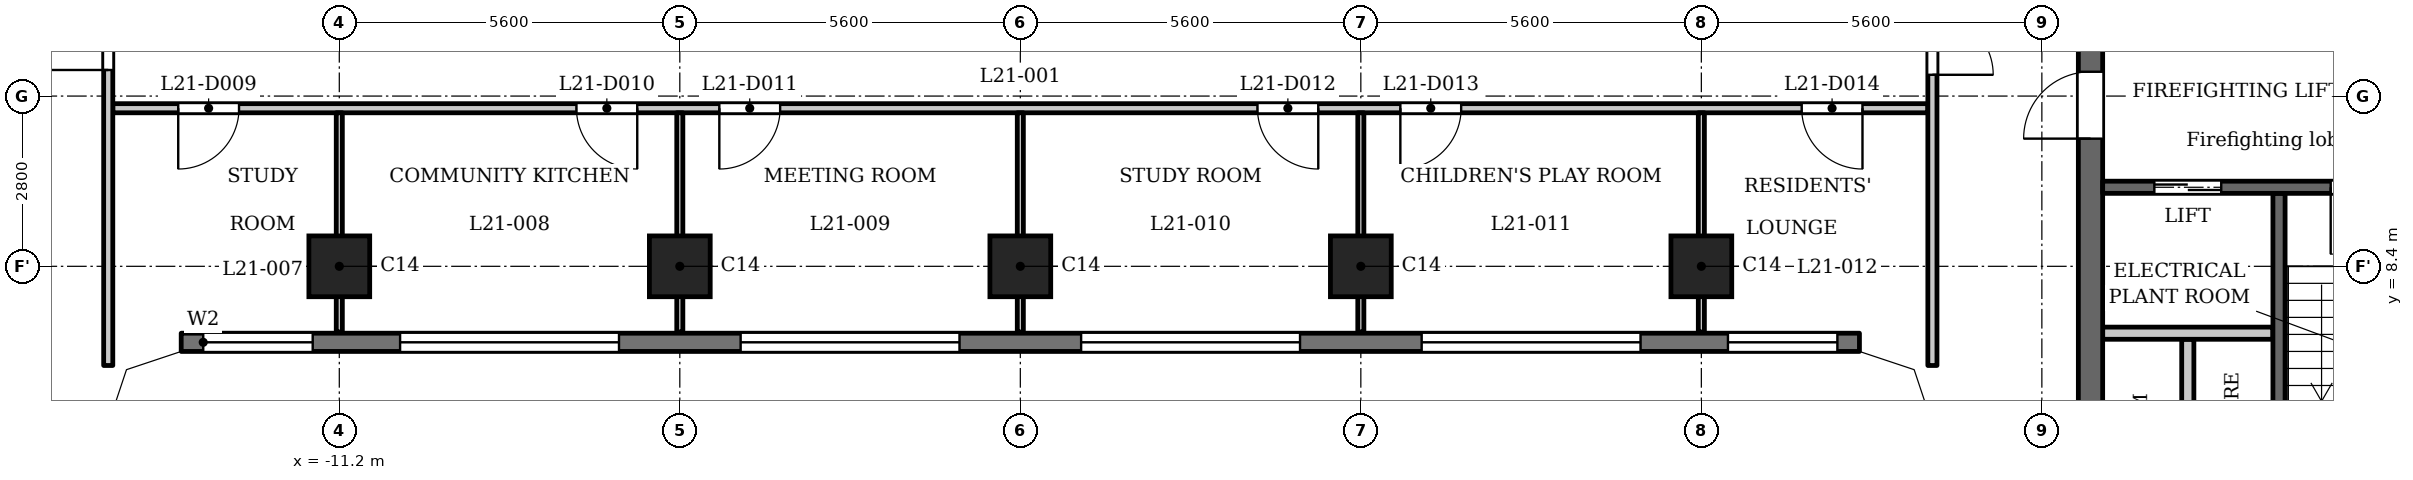
"""IFC4 building model, lengths in metres.
Left out: names, types, materials, properties, quantities, classifications, styles, units other than length and angle.
Written with IfcOpenShell. Run it as: python <this file> out.ifc"""

import sys

from ifc_helpers import new_model, si_unit, direction, frame, frame_2d, origin, origin_2d, place, context, subcontext, project, spatial, polyline, rectangle, outline, extrude, element, fill, save


model = new_model("IFC4")
c1 = context("Model", 3, precision=1e-05, world=origin(), true_north=direction((0.0, 1.0)))
c2 = subcontext(c1, "Body", "Model", "MODEL_VIEW")
j1 = project(units=[si_unit("LENGTHUNIT", "METRE"), si_unit("PLANEANGLEUNIT", "RADIAN")], contexts=[c1])
p1 = place(None, origin())
s1 = spatial("IfcSite", under=j1, at=p1, CompositionType="ELEMENT")
p2 = place(p1, origin())
s2 = spatial("IfcBuilding", under=s1, at=p2, CompositionType="ELEMENT")
p3 = place(p2, frame((0.0, 0.0, 86.8)))
s3 = spatial("IfcBuildingStorey", under=s2, at=p3, CompositionType="ELEMENT", Elevation=86.8)
for number, where, z_axis, x_axis in (
    (1, (-11.2, 8.4, 0.0), (0.0, 0.0, 1.0), (1.0, 0.0, 0.0)),
    (2, (-5.6, 8.4, 0.0), (0.0, 0.0, 1.0), (1.0, 0.0, 0.0)),
    (3, (0.0, 8.4, 0.0), (0.0, 0.0, 1.0), (1.0, 0.0, 0.0)),
    (4, (5.6, 8.4, 0.0), (0.0, 0.0, 1.0), (1.0, 0.0, 0.0)),
    (5, (11.2, 8.4, 0.0), (0.0, 0.0, 1.0), (1.0, 0.0, 0.0)),
):
    element("IfcColumn", number, at=place(p3, frame(where, z_axis=z_axis, x_axis=x_axis)), inside=s3, PredefinedType="COLUMN", context=c2, shape_type="SweptSolid", body=[
        extrude(rectangle(XDim=1.0, YDim=1.0, at=origin_2d()), origin(), (0.0, 0.0, 1.0), 3.5),
    ])
p4 = place(p3, frame((-13.8, 7.15, 0.0), z_axis=(0.0, 0.0, 1.0), x_axis=(1.0, 0.0, 0.0)))
e6 = element("IfcWall", 6, at=p4, inside=s3, PredefinedType="SOLIDWALL", context=c2, shape_type="SweptSolid", body=[
    extrude(rectangle(XDim=27.6, YDim=0.3, at=frame_2d((13.8, 0.0))), origin(), (0.0, 0.0, 1.0), 3.2),
])
p5 = place(p4, frame((0.363, 0.0, 0.9)))
e7 = element("IfcOpeningElement", 7, at=p5, cuts=e6, PredefinedType="OPENING", context=c2, shape_type="SweptSolid", body=[
    extrude(rectangle(XDim=1.8, YDim=1.25, at=frame_2d((0.9, 0.625))), frame((0.0, 0.16, 0.0), z_axis=(0.0, -1.0, 0.0), x_axis=(1.0, 0.0, 0.0)), (0.0, 0.0, 1.0), 0.32),
])
p6 = place(p4, frame((3.6, 0.0, 1.2)))
e8 = element("IfcOpeningElement", 8, at=p6, cuts=e6, PredefinedType="OPENING", context=c2, shape_type="SweptSolid", body=[
    extrude(rectangle(XDim=3.6, YDim=0.95, at=frame_2d((1.8, 0.475))), frame((0.0, 0.16, 0.0), z_axis=(0.0, -1.0, 0.0), x_axis=(1.0, 0.0, 0.0)), (0.0, 0.0, 1.0), 0.32),
])
p7 = place(p4, frame((9.2, 0.0, 1.2)))
e9 = element("IfcOpeningElement", 9, at=p7, cuts=e6, PredefinedType="OPENING", context=c2, shape_type="SweptSolid", body=[
    extrude(rectangle(XDim=3.6, YDim=0.95, at=frame_2d((1.8, 0.475))), frame((0.0, 0.16, 0.0), z_axis=(0.0, -1.0, 0.0), x_axis=(1.0, 0.0, 0.0)), (0.0, 0.0, 1.0), 0.32),
])
p8 = place(p4, frame((14.8, 0.0, 1.2)))
e10 = element("IfcOpeningElement", 10, at=p8, cuts=e6, PredefinedType="OPENING", context=c2, shape_type="SweptSolid", body=[
    extrude(rectangle(XDim=3.6, YDim=0.95, at=frame_2d((1.8, 0.475))), frame((0.0, 0.16, 0.0), z_axis=(0.0, -1.0, 0.0), x_axis=(1.0, 0.0, 0.0)), (0.0, 0.0, 1.0), 0.32),
])
p9 = place(p4, frame((20.4, 0.0, 1.2)))
e11 = element("IfcOpeningElement", 11, at=p9, cuts=e6, PredefinedType="OPENING", context=c2, shape_type="SweptSolid", body=[
    extrude(rectangle(XDim=3.6, YDim=0.95, at=frame_2d((1.8, 0.475))), frame((0.0, 0.16, 0.0), z_axis=(0.0, -1.0, 0.0), x_axis=(1.0, 0.0, 0.0)), (0.0, 0.0, 1.0), 0.32),
])
p10 = place(p4, frame((25.438, 0.0, 0.9)))
e12 = element("IfcOpeningElement", 12, at=p10, cuts=e6, PredefinedType="OPENING", context=c2, shape_type="SweptSolid", body=[
    extrude(rectangle(XDim=1.8, YDim=1.25, at=frame_2d((0.9, 0.625))), frame((0.0, 0.16, 0.0), z_axis=(0.0, -1.0, 0.0), x_axis=(1.0, 0.0, 0.0)), (0.0, 0.0, 1.0), 0.32),
])
p11 = place(p3, frame((20.7, 2.6, 0.0), z_axis=(0.0, 0.0, 1.0), x_axis=(0.0, 1.0, 0.0)))
e13 = element("IfcWall", 13, at=p11, inside=s3, PredefinedType="SHEAR", context=c2, shape_type="SweptSolid", body=[
    extrude(rectangle(XDim=7.0, YDim=0.2, at=frame_2d((3.5, 0.0))), origin(), (0.0, 0.0, 1.0), 3.2),
])
p12 = place(p3, frame((19.2, 2.6, 0.0), z_axis=(0.0, 0.0, 1.0), x_axis=(0.0, 1.0, 0.0)))
e14 = element("IfcWall", 14, at=p12, inside=s3, PredefinedType="PARTITIONING", context=c2, shape_type="SweptSolid", body=[
    extrude(rectangle(XDim=4.6, YDim=0.2, at=frame_2d((2.3, 0.0))), origin(), (0.0, 0.0, 1.0), 3.2),
])
p13 = place(p3, frame((17.6, -12.3, 0.0), z_axis=(0.0, 0.0, 1.0), x_axis=(0.0, 1.0, 0.0)))
e15 = element("IfcWall", 15, at=p13, inside=s3, PredefinedType="SHEAR", context=c2, shape_type="SweptSolid", body=[
    extrude(rectangle(XDim=24.6, YDim=0.4, at=frame_2d((12.3, 0.0))), origin(), (0.0, 0.0, 1.0), 3.2),
])
p14 = place(p13, frame((6.0, 0.0, 0.0)))
e16 = element("IfcOpeningElement", 16, at=p14, cuts=e15, PredefinedType="OPENING", context=c2, shape_type="SweptSolid", body=[
    extrude(rectangle(XDim=1.1, YDim=2.1, at=frame_2d((0.55, 1.05))), frame((0.0, 0.21, 0.0), z_axis=(0.0, -1.0, 0.0), x_axis=(1.0, 0.0, 0.0)), (0.0, 0.0, 1.0), 0.42),
])
p15 = place(p13, frame((8.4, 0.0, 0.0)))
e17 = element("IfcOpeningElement", 17, at=p15, cuts=e15, PredefinedType="OPENING", context=c2, shape_type="SweptSolid", body=[
    extrude(rectangle(XDim=1.1, YDim=2.1, at=frame_2d((0.55, 1.05))), frame((0.0, 0.21, 0.0), z_axis=(0.0, -1.0, 0.0), x_axis=(1.0, 0.0, 0.0)), (0.0, 0.0, 1.0), 0.42),
])
p16 = place(p13, frame((10.8, 0.0, 0.0)))
e18 = element("IfcOpeningElement", 18, at=p16, cuts=e15, PredefinedType="OPENING", context=c2, shape_type="SweptSolid", body=[
    extrude(rectangle(XDim=1.1, YDim=2.1, at=frame_2d((0.55, 1.05))), frame((0.0, 0.21, 0.0), z_axis=(0.0, -1.0, 0.0), x_axis=(1.0, 0.0, 0.0)), (0.0, 0.0, 1.0), 0.42),
])
p17 = place(p13, frame((16.75, 0.0, 0.0)))
e19 = element("IfcOpeningElement", 19, at=p17, cuts=e15, PredefinedType="OPENING", context=c2, shape_type="SweptSolid", body=[
    extrude(rectangle(XDim=0.9, YDim=2.1, at=frame_2d((0.45, 1.05))), frame((0.0, 0.21, 0.0), z_axis=(0.0, -1.0, 0.0), x_axis=(1.0, 0.0, 0.0)), (0.0, 0.0, 1.0), 0.42),
])
p18 = place(p13, frame((22.8, 0.0, 0.0)))
e20 = element("IfcOpeningElement", 20, at=p18, cuts=e15, PredefinedType="OPENING", context=c2, shape_type="SweptSolid", body=[
    extrude(rectangle(XDim=1.1, YDim=2.1, at=frame_2d((0.55, 1.05))), frame((0.0, 0.21, 0.0), z_axis=(0.0, -1.0, 0.0), x_axis=(1.0, 0.0, 0.0)), (0.0, 0.0, 1.0), 0.42),
])
p19 = place(p13, frame((0.7, 0.0, 0.0)))
e21 = element("IfcOpeningElement", 21, at=p19, cuts=e15, PredefinedType="OPENING", context=c2, shape_type="SweptSolid", body=[
    extrude(rectangle(XDim=1.1, YDim=2.1, at=frame_2d((0.55, 1.05))), frame((0.0, 0.21, 0.0), z_axis=(0.0, -1.0, 0.0), x_axis=(1.0, 0.0, 0.0)), (0.0, 0.0, 1.0), 0.42),
])
p20 = place(p13, frame((12.775, 0.0, 0.0)))
e22 = element("IfcOpeningElement", 22, at=p20, cuts=e15, PredefinedType="OPENING", context=c2, shape_type="SweptSolid", body=[
    extrude(rectangle(XDim=1.8, YDim=2.1, at=frame_2d((0.9, 1.05))), frame((0.0, 0.21, 0.0), z_axis=(0.0, -1.0, 0.0), x_axis=(1.0, 0.0, 0.0)), (0.0, 0.0, 1.0), 0.42),
])
p21 = place(p3, frame((17.8, 7.3, 0.0), z_axis=(0.0, 0.0, 1.0), x_axis=(1.0, 0.0, 0.0)))
e23 = element("IfcWall", 23, at=p21, inside=s3, PredefinedType="PARTITIONING", context=c2, shape_type="SweptSolid", body=[
    extrude(rectangle(XDim=2.8, YDim=0.2, at=frame_2d((1.4, 0.0))), origin(), (0.0, 0.0, 1.0), 3.2),
])
p22 = place(p3, frame((17.8, 9.7, 0.0), z_axis=(0.0, 0.0, 1.0), x_axis=(1.0, 0.0, 0.0)))
e24 = element("IfcWall", 24, at=p22, inside=s3, PredefinedType="SHEAR", context=c2, shape_type="SweptSolid", body=[
    extrude(rectangle(XDim=8.3, YDim=0.2, at=frame_2d((4.15, 0.0))), origin(), (0.0, 0.0, 1.0), 3.2),
])
p23 = place(p22, frame((0.85, 0.0, 0.0)))
e25 = element("IfcOpeningElement", 25, at=p23, cuts=e24, PredefinedType="OPENING", context=c2, shape_type="SweptSolid", body=[
    extrude(rectangle(XDim=1.1, YDim=2.1, at=frame_2d((0.55, 1.05))), frame((0.0, 0.11, 0.0), z_axis=(0.0, -1.0, 0.0), x_axis=(1.0, 0.0, 0.0)), (0.0, 0.0, 1.0), 0.22),
])
p24 = place(p22, frame((3.75, 0.0, 0.0)))
e26 = element("IfcOpeningElement", 26, at=p24, cuts=e24, PredefinedType="OPENING", context=c2, shape_type="SweptSolid", body=[
    extrude(rectangle(XDim=1.1, YDim=2.1, at=frame_2d((0.55, 1.05))), frame((0.0, 0.11, 0.0), z_axis=(0.0, -1.0, 0.0), x_axis=(1.0, 0.0, 0.0)), (0.0, 0.0, 1.0), 0.22),
])
p25 = place(p3, frame((-14.925, 11.0, 0.0), z_axis=(0.0, 0.0, 1.0), x_axis=(1.0, 0.0, 0.0)))
e27 = element("IfcWall", 27, at=p25, inside=s3, PredefinedType="PARTITIONING", context=c2, shape_type="SweptSolid", body=[
    extrude(rectangle(XDim=29.85, YDim=0.15, at=frame_2d((14.925, 0.0))), origin(), (0.0, 0.0, 1.0), 3.2),
])
p26 = place(p25, frame((1.076, 0.0, 0.0)))
e28 = element("IfcOpeningElement", 28, at=p26, cuts=e27, PredefinedType="OPENING", context=c2, shape_type="SweptSolid", body=[
    extrude(rectangle(XDim=1.0, YDim=2.1, at=frame_2d((0.5, 1.05))), frame((0.0, 0.085, 0.0), z_axis=(0.0, -1.0, 0.0), x_axis=(1.0, 0.0, 0.0)), (0.0, 0.0, 1.0), 0.17),
])
p27 = place(p25, frame((7.625, 0.0, 0.0)))
e29 = element("IfcOpeningElement", 29, at=p27, cuts=e27, PredefinedType="OPENING", context=c2, shape_type="SweptSolid", body=[
    extrude(rectangle(XDim=1.0, YDim=2.1, at=frame_2d((0.5, 1.05))), frame((0.0, 0.085, 0.0), z_axis=(0.0, -1.0, 0.0), x_axis=(1.0, 0.0, 0.0)), (0.0, 0.0, 1.0), 0.17),
])
p28 = place(p25, frame((9.975, 0.0, 0.0)))
e30 = element("IfcOpeningElement", 30, at=p28, cuts=e27, PredefinedType="OPENING", context=c2, shape_type="SweptSolid", body=[
    extrude(rectangle(XDim=1.0, YDim=2.1, at=frame_2d((0.5, 1.05))), frame((0.0, 0.085, 0.0), z_axis=(0.0, -1.0, 0.0), x_axis=(1.0, 0.0, 0.0)), (0.0, 0.0, 1.0), 0.17),
])
p29 = place(p25, frame((18.825, 0.0, 0.0)))
e31 = element("IfcOpeningElement", 31, at=p29, cuts=e27, PredefinedType="OPENING", context=c2, shape_type="SweptSolid", body=[
    extrude(rectangle(XDim=1.0, YDim=2.1, at=frame_2d((0.5, 1.05))), frame((0.0, 0.085, 0.0), z_axis=(0.0, -1.0, 0.0), x_axis=(1.0, 0.0, 0.0)), (0.0, 0.0, 1.0), 0.17),
])
p30 = place(p25, frame((21.175, 0.0, 0.0)))
e32 = element("IfcOpeningElement", 32, at=p30, cuts=e27, PredefinedType="OPENING", context=c2, shape_type="SweptSolid", body=[
    extrude(rectangle(XDim=1.0, YDim=2.1, at=frame_2d((0.5, 1.05))), frame((0.0, 0.085, 0.0), z_axis=(0.0, -1.0, 0.0), x_axis=(1.0, 0.0, 0.0)), (0.0, 0.0, 1.0), 0.17),
])
p31 = place(p25, frame((27.775, 0.0, 0.0)))
e33 = element("IfcOpeningElement", 33, at=p31, cuts=e27, PredefinedType="OPENING", context=c2, shape_type="SweptSolid", body=[
    extrude(rectangle(XDim=1.0, YDim=2.1, at=frame_2d((0.5, 1.05))), frame((0.0, 0.085, 0.0), z_axis=(0.0, -1.0, 0.0), x_axis=(1.0, 0.0, 0.0)), (0.0, 0.0, 1.0), 0.17),
])
p32 = place(p3, frame((-15.0, 6.769, 0.0), z_axis=(0.0, 0.0, 1.0), x_axis=(0.0, 1.0, 0.0)))
e34 = element("IfcWall", 34, at=p32, inside=s3, PredefinedType="PARTITIONING", context=c2, shape_type="SweptSolid", body=[
    extrude(rectangle(XDim=6.356, YDim=0.15, at=frame_2d((3.178, 0.0))), origin(), (0.0, 0.0, 1.0), 3.2),
])
p33 = place(p32, frame((4.86, 0.0, 0.0)))
e35 = element("IfcOpeningElement", 35, at=p33, cuts=e34, PredefinedType="OPENING", context=c2, shape_type="SweptSolid", body=[
    extrude(rectangle(XDim=1.0, YDim=2.1, at=frame_2d((0.5, 1.05))), frame((0.0, 0.085, 0.0), z_axis=(0.0, -1.0, 0.0), x_axis=(1.0, 0.0, 0.0)), (0.0, 0.0, 1.0), 0.17),
])
for number, where, z_axis, x_axis in (
    (36, (-11.2, 7.32, 0.0), (0.0, 0.0, 1.0), (0.0, 1.0, 0.0)),
    (37, (-5.6, 7.32, 0.0), (0.0, 0.0, 1.0), (0.0, 1.0, 0.0)),
    (38, (0.0, 7.32, 0.0), (0.0, 0.0, 1.0), (0.0, 1.0, 0.0)),
    (39, (5.6, 7.32, 0.0), (0.0, 0.0, 1.0), (0.0, 1.0, 0.0)),
    (40, (11.2, 7.32, 0.0), (0.0, 0.0, 1.0), (0.0, 1.0, 0.0)),
):
    element("IfcWall", number, at=place(p3, frame(where, z_axis=z_axis, x_axis=x_axis)), inside=s3, PredefinedType="PARTITIONING", context=c2, shape_type="SweptSolid", body=[
        extrude(rectangle(XDim=3.605, YDim=0.1, at=frame_2d((1.802, 0.0))), origin(), (0.0, 0.0, 1.0), 3.2),
    ])
p34 = place(p3, frame((15.0, 6.769, 0.0), z_axis=(0.0, 0.0, 1.0), x_axis=(0.0, 1.0, 0.0)))
e41 = element("IfcWall", 41, at=p34, inside=s3, PredefinedType="PARTITIONING", context=c2, shape_type="SweptSolid", body=[
    extrude(rectangle(XDim=6.356, YDim=0.15, at=frame_2d((3.178, 0.0))), origin(), (0.0, 0.0, 1.0), 3.2),
])
p35 = place(p34, frame((4.781, 0.0, 0.0)))
e42 = element("IfcOpeningElement", 42, at=p35, cuts=e41, PredefinedType="OPENING", context=c2, shape_type="SweptSolid", body=[
    extrude(rectangle(XDim=1.0, YDim=2.1, at=frame_2d((0.5, 1.05))), frame((0.0, 0.085, 0.0), z_axis=(0.0, -1.0, 0.0), x_axis=(1.0, 0.0, 0.0)), (0.0, 0.0, 1.0), 0.17),
])
p36 = place(p3, origin())
e43 = element("IfcWall", 43, at=p36, inside=s3, PredefinedType="SOLIDWALL", context=c2, shape_type="SweptSolid", body=[
    extrude(outline(polyline([(-13.849, 7.3), (-14.937, 6.937), (-15.3, 5.849), (-15.3, 5.8), (-15.0, 5.8), (-14.7, 6.7), (-13.8, 7.0), (-13.8, 7.3), (-13.849, 7.3)])), origin(), (0.0, 0.0, 1.0), 3.2),
])
e44 = element("IfcWall", 44, at=p36, inside=s3, PredefinedType="SOLIDWALL", context=c2, shape_type="SweptSolid", body=[
    extrude(outline(polyline([(14.937, 6.937), (13.849, 7.3), (13.8, 7.3), (13.8, 7.0), (14.7, 6.7), (15.0, 5.8), (15.3, 5.8), (15.3, 5.849), (14.937, 6.937)])), origin(), (0.0, 0.0, 1.0), 3.2),
])
p37 = place(p23, origin())
e45 = element("IfcDoor", 45, at=p37, inside=s3, OperationType="DOUBLE_DOOR_SLIDING", PredefinedType="DOOR", context=c2, shape_type="SweptSolid", body=[
    extrude(rectangle(XDim=1.1, YDim=2.1, at=frame_2d((0.55, 1.05))), frame((0.0, 0.025, 0.0), z_axis=(0.0, -1.0, 0.0), x_axis=(1.0, 0.0, 0.0)), (0.0, 0.0, 1.0), 0.05),
])
fill(e25, e45)
p38 = place(p18, origin())
e46 = element("IfcDoor", 46, at=p38, inside=s3, OperationType="SINGLE_SWING_RIGHT", PredefinedType="DOOR", context=c2, shape_type="SweptSolid", body=[
    extrude(rectangle(XDim=1.1, YDim=2.1, at=frame_2d((0.55, 1.05))), frame((0.0, 0.025, 0.0), z_axis=(0.0, -1.0, 0.0), x_axis=(1.0, 0.0, 0.0)), (0.0, 0.0, 1.0), 0.05),
])
fill(e20, e46)
p39 = place(p24, origin())
e47 = element("IfcDoor", 47, at=p39, inside=s3, OperationType="SINGLE_SWING_LEFT", PredefinedType="DOOR", context=c2, shape_type="SweptSolid", body=[
    extrude(rectangle(XDim=1.1, YDim=2.1, at=frame_2d((0.55, 1.05))), frame((0.0, 0.025, 0.0), z_axis=(0.0, -1.0, 0.0), x_axis=(1.0, 0.0, 0.0)), (0.0, 0.0, 1.0), 0.05),
])
fill(e26, e47)
p40 = place(p33, origin())
e48 = element("IfcDoor", 48, at=p40, inside=s3, OperationType="SINGLE_SWING_RIGHT", PredefinedType="DOOR", context=c2, shape_type="SweptSolid", body=[
    extrude(rectangle(XDim=1.0, YDim=2.1, at=frame_2d((0.5, 1.05))), frame((0.0, 0.025, 0.0), z_axis=(0.0, -1.0, 0.0), x_axis=(1.0, 0.0, 0.0)), (0.0, 0.0, 1.0), 0.05),
])
fill(e35, e48)
p41 = place(p35, origin())
e49 = element("IfcDoor", 49, at=p41, inside=s3, OperationType="SINGLE_SWING_LEFT", PredefinedType="DOOR", context=c2, shape_type="SweptSolid", body=[
    extrude(rectangle(XDim=1.0, YDim=2.1, at=frame_2d((0.5, 1.05))), frame((0.0, 0.025, 0.0), z_axis=(0.0, -1.0, 0.0), x_axis=(1.0, 0.0, 0.0)), (0.0, 0.0, 1.0), 0.05),
])
fill(e42, e49)
p42 = place(p26, origin())
e50 = element("IfcDoor", 50, at=p42, inside=s3, OperationType="SINGLE_SWING_LEFT", PredefinedType="DOOR", context=c2, shape_type="SweptSolid", body=[
    extrude(rectangle(XDim=1.0, YDim=2.1, at=frame_2d((0.5, 1.05))), frame((0.0, 0.025, 0.0), z_axis=(0.0, -1.0, 0.0), x_axis=(1.0, 0.0, 0.0)), (0.0, 0.0, 1.0), 0.05),
])
fill(e28, e50)
p43 = place(p27, origin())
e51 = element("IfcDoor", 51, at=p43, inside=s3, OperationType="SINGLE_SWING_RIGHT", PredefinedType="DOOR", context=c2, shape_type="SweptSolid", body=[
    extrude(rectangle(XDim=1.0, YDim=2.1, at=frame_2d((0.5, 1.05))), frame((0.0, 0.025, 0.0), z_axis=(0.0, -1.0, 0.0), x_axis=(1.0, 0.0, 0.0)), (0.0, 0.0, 1.0), 0.05),
])
fill(e29, e51)
p44 = place(p28, origin())
e52 = element("IfcDoor", 52, at=p44, inside=s3, OperationType="SINGLE_SWING_LEFT", PredefinedType="DOOR", context=c2, shape_type="SweptSolid", body=[
    extrude(rectangle(XDim=1.0, YDim=2.1, at=frame_2d((0.5, 1.05))), frame((0.0, 0.025, 0.0), z_axis=(0.0, -1.0, 0.0), x_axis=(1.0, 0.0, 0.0)), (0.0, 0.0, 1.0), 0.05),
])
fill(e30, e52)
p45 = place(p29, origin())
e53 = element("IfcDoor", 53, at=p45, inside=s3, OperationType="SINGLE_SWING_RIGHT", PredefinedType="DOOR", context=c2, shape_type="SweptSolid", body=[
    extrude(rectangle(XDim=1.0, YDim=2.1, at=frame_2d((0.5, 1.05))), frame((0.0, 0.025, 0.0), z_axis=(0.0, -1.0, 0.0), x_axis=(1.0, 0.0, 0.0)), (0.0, 0.0, 1.0), 0.05),
])
fill(e31, e53)
p46 = place(p30, origin())
e54 = element("IfcDoor", 54, at=p46, inside=s3, OperationType="SINGLE_SWING_LEFT", PredefinedType="DOOR", context=c2, shape_type="SweptSolid", body=[
    extrude(rectangle(XDim=1.0, YDim=2.1, at=frame_2d((0.5, 1.05))), frame((0.0, 0.025, 0.0), z_axis=(0.0, -1.0, 0.0), x_axis=(1.0, 0.0, 0.0)), (0.0, 0.0, 1.0), 0.05),
])
fill(e32, e54)
p47 = place(p31, origin())
e55 = element("IfcDoor", 55, at=p47, inside=s3, OperationType="SINGLE_SWING_RIGHT", PredefinedType="DOOR", context=c2, shape_type="SweptSolid", body=[
    extrude(rectangle(XDim=1.0, YDim=2.1, at=frame_2d((0.5, 1.05))), frame((0.0, 0.025, 0.0), z_axis=(0.0, -1.0, 0.0), x_axis=(1.0, 0.0, 0.0)), (0.0, 0.0, 1.0), 0.05),
])
fill(e33, e55)
p48 = place(p5, origin())
e56 = element("IfcWindow", 56, at=p48, inside=s3, PartitioningType="SINGLE_PANEL", PredefinedType="WINDOW", context=c2, shape_type="SweptSolid", body=[
    extrude(rectangle(XDim=1.8, YDim=1.25, at=frame_2d((0.9, 0.625))), frame((0.0, 0.03, 0.0), z_axis=(0.0, -1.0, 0.0), x_axis=(1.0, 0.0, 0.0)), (0.0, 0.0, 1.0), 0.06),
])
fill(e7, e56)
p49 = place(p6, origin())
e57 = element("IfcWindow", 57, at=p49, inside=s3, PartitioningType="SINGLE_PANEL", PredefinedType="WINDOW", context=c2, shape_type="SweptSolid", body=[
    extrude(rectangle(XDim=3.6, YDim=0.95, at=frame_2d((1.8, 0.475))), frame((0.0, 0.03, 0.0), z_axis=(0.0, -1.0, 0.0), x_axis=(1.0, 0.0, 0.0)), (0.0, 0.0, 1.0), 0.06),
])
fill(e8, e57)
p50 = place(p7, origin())
e58 = element("IfcWindow", 58, at=p50, inside=s3, PartitioningType="SINGLE_PANEL", PredefinedType="WINDOW", context=c2, shape_type="SweptSolid", body=[
    extrude(rectangle(XDim=3.6, YDim=0.95, at=frame_2d((1.8, 0.475))), frame((0.0, 0.03, 0.0), z_axis=(0.0, -1.0, 0.0), x_axis=(1.0, 0.0, 0.0)), (0.0, 0.0, 1.0), 0.06),
])
fill(e9, e58)
p51 = place(p8, origin())
e59 = element("IfcWindow", 59, at=p51, inside=s3, PartitioningType="SINGLE_PANEL", PredefinedType="WINDOW", context=c2, shape_type="SweptSolid", body=[
    extrude(rectangle(XDim=3.6, YDim=0.95, at=frame_2d((1.8, 0.475))), frame((0.0, 0.03, 0.0), z_axis=(0.0, -1.0, 0.0), x_axis=(1.0, 0.0, 0.0)), (0.0, 0.0, 1.0), 0.06),
])
fill(e10, e59)
p52 = place(p9, origin())
e60 = element("IfcWindow", 60, at=p52, inside=s3, PartitioningType="SINGLE_PANEL", PredefinedType="WINDOW", context=c2, shape_type="SweptSolid", body=[
    extrude(rectangle(XDim=3.6, YDim=0.95, at=frame_2d((1.8, 0.475))), frame((0.0, 0.03, 0.0), z_axis=(0.0, -1.0, 0.0), x_axis=(1.0, 0.0, 0.0)), (0.0, 0.0, 1.0), 0.06),
])
fill(e11, e60)
p53 = place(p10, origin())
e61 = element("IfcWindow", 61, at=p53, inside=s3, PartitioningType="SINGLE_PANEL", PredefinedType="WINDOW", context=c2, shape_type="SweptSolid", body=[
    extrude(rectangle(XDim=1.8, YDim=1.25, at=frame_2d((0.9, 0.625))), frame((0.0, 0.03, 0.0), z_axis=(0.0, -1.0, 0.0), x_axis=(1.0, 0.0, 0.0)), (0.0, 0.0, 1.0), 0.06),
])
fill(e12, e61)
save(model, sys.argv[1])
